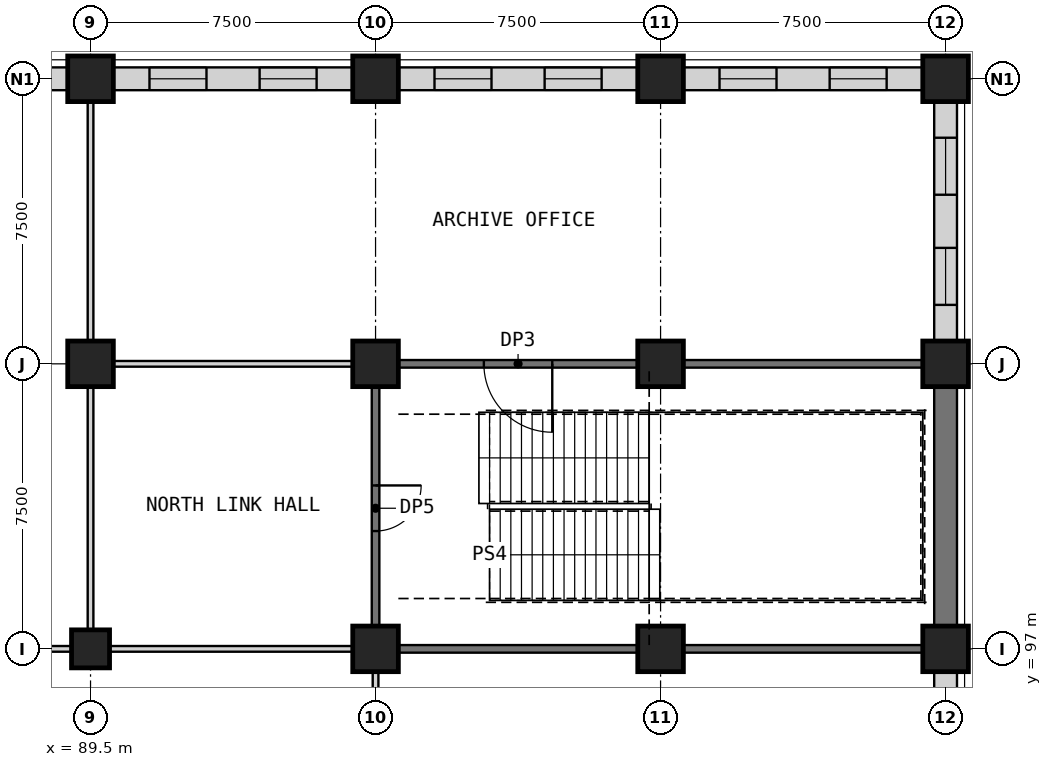
"""IFC4 building model, lengths in metres.
Left out: names, types, materials, properties, quantities, classifications, styles, units other than length and angle.
Written with IfcOpenShell. Run it as: python <this file> out.ifc"""

import sys

from ifc_helpers import new_model, si_unit, direction, frame, frame_2d, origin, origin_2d, place, context, subcontext, project, spatial, rectangle, extrude, element, fill, save


model = new_model("IFC4")
c1 = context("Model", 3, precision=1e-05, world=origin(), true_north=direction((0.0, 1.0)))
c2 = subcontext(c1, "Body", "Model", "MODEL_VIEW")
j1 = project(units=[si_unit("LENGTHUNIT", "METRE"), si_unit("PLANEANGLEUNIT", "RADIAN")], contexts=[c1])
p1 = place(None, origin())
s1 = spatial("IfcSite", under=j1, at=p1, CompositionType="ELEMENT")
p2 = place(p1, origin())
s2 = spatial("IfcBuilding", under=s1, at=p2, CompositionType="ELEMENT")
p3 = place(p2, frame((0.0, 0.0, 23.5)))
s3 = spatial("IfcBuildingStorey", under=s2, at=p3, CompositionType="ELEMENT", Elevation=23.5)
p4 = place(p3, frame((89.5, 97.0, 0.0), z_axis=(0.0, 0.0, 1.0), x_axis=(1.0, 0.0, 0.0)))
e1 = element("IfcColumn", 1, at=p4, inside=s3, PredefinedType="COLUMN", context=c2, shape_type="SweptSolid", body=[
    extrude(rectangle(XDim=1.0, YDim=1.0, at=origin_2d()), origin(), (0.0, 0.0, 1.0), 5.5),
])
for number, where, z_axis, x_axis in (
    (2, (89.5, 104.5, 0.0), (0.0, 0.0, 1.0), (1.0, 0.0, 0.0)),
    (3, (89.5, 112.0, 0.0), (0.0, 0.0, 1.0), (1.0, 0.0, 0.0)),
    (4, (97.0, 97.0, 0.0), (0.0, 0.0, 1.0), (1.0, 0.0, 0.0)),
    (5, (97.0, 104.5, 0.0), (0.0, 0.0, 1.0), (1.0, 0.0, 0.0)),
    (6, (97.0, 112.0, 0.0), (0.0, 0.0, 1.0), (1.0, 0.0, 0.0)),
    (7, (104.5, 97.0, 0.0), (0.0, 0.0, 1.0), (1.0, 0.0, 0.0)),
    (8, (104.5, 104.5, 0.0), (0.0, 0.0, 1.0), (1.0, 0.0, 0.0)),
    (9, (104.5, 112.0, 0.0), (0.0, 0.0, 1.0), (1.0, 0.0, 0.0)),
    (10, (112.0, 97.0, 0.0), (0.0, 0.0, 1.0), (1.0, 0.0, 0.0)),
    (11, (112.0, 104.5, 0.0), (0.0, 0.0, 1.0), (1.0, 0.0, 0.0)),
    (12, (112.0, 112.0, 0.0), (0.0, 0.0, 1.0), (1.0, 0.0, 0.0)),
):
    element("IfcColumn", number, at=place(p3, frame(where, z_axis=z_axis, x_axis=x_axis)), inside=s3, PredefinedType="COLUMN", context=c2, shape_type="SweptSolid", body=[
        extrude(rectangle(XDim=1.2, YDim=1.2, at=origin_2d()), origin(), (0.0, 0.0, 1.0), 5.5),
    ])
for number, where, z_axis, x_axis in (
    (13, (82.6, 97.0, 0.0), (0.0, 0.0, 1.0), (1.0, 0.0, 0.0)),
    (14, (90.0, 97.0, 0.0), (0.0, 0.0, 1.0), (1.0, 0.0, 0.0)),
):
    element("IfcWall", number, at=place(p3, frame(where, z_axis=z_axis, x_axis=x_axis)), inside=s3, PredefinedType="PARTITIONING", context=c2, shape_type="SweptSolid", body=[
        extrude(rectangle(XDim=6.4, YDim=0.15, at=frame_2d((3.2, 0.0))), origin(), (0.0, 0.0, 1.0), 5.2),
    ])
for number, where, z_axis, x_axis in (
    (15, (97.6, 97.0, 0.0), (0.0, 0.0, 1.0), (1.0, 0.0, 0.0)),
    (16, (105.1, 97.0, 0.0), (0.0, 0.0, 1.0), (1.0, 0.0, 0.0)),
):
    element("IfcWall", number, at=place(p3, frame(where, z_axis=z_axis, x_axis=x_axis)), inside=s3, PredefinedType="SHEAR", context=c2, shape_type="SweptSolid", body=[
        extrude(rectangle(XDim=6.3, YDim=0.2, at=frame_2d((3.15, 0.0))), origin(), (0.0, 0.0, 1.0), 5.2),
    ])
p5 = place(p3, frame((82.6, 112.0, 0.0), z_axis=(0.0, 0.0, 1.0), x_axis=(1.0, 0.0, 0.0)))
e17 = element("IfcWall", 17, at=p5, inside=s3, PredefinedType="PARTITIONING", context=c2, shape_type="SweptSolid", body=[
    extrude(rectangle(XDim=6.3, YDim=0.6, at=frame_2d((3.15, 0.0))), origin(), (0.0, 0.0, 1.0), 4.6),
])
p6 = place(p5, frame((0.951, 0.0, 0.9)))
e18 = element("IfcOpeningElement", 18, at=p6, cuts=e17, PredefinedType="OPENING", context=c2, shape_type="SweptSolid", body=[
    extrude(rectangle(XDim=1.5, YDim=2.8, at=frame_2d((0.75, 1.4))), frame((0.0, 0.31, 0.0), z_axis=(0.0, -1.0, 0.0), x_axis=(1.0, 0.0, 0.0)), (0.0, 0.0, 1.0), 0.62),
])
p7 = place(p5, frame((3.849, 0.0, 0.9)))
e19 = element("IfcOpeningElement", 19, at=p7, cuts=e17, PredefinedType="OPENING", context=c2, shape_type="SweptSolid", body=[
    extrude(rectangle(XDim=1.5, YDim=2.8, at=frame_2d((0.75, 1.4))), frame((0.0, 0.31, 0.0), z_axis=(0.0, -1.0, 0.0), x_axis=(1.0, 0.0, 0.0)), (0.0, 0.0, 1.0), 0.62),
])
p8 = place(p3, frame((90.1, 112.0, 0.0), z_axis=(0.0, 0.0, 1.0), x_axis=(1.0, 0.0, 0.0)))
e20 = element("IfcWall", 20, at=p8, inside=s3, PredefinedType="PARTITIONING", context=c2, shape_type="SweptSolid", body=[
    extrude(rectangle(XDim=6.3, YDim=0.6, at=frame_2d((3.15, 0.0))), origin(), (0.0, 0.0, 1.0), 4.6),
])
p9 = place(p8, frame((0.951, 0.0, 0.9)))
e21 = element("IfcOpeningElement", 21, at=p9, cuts=e20, PredefinedType="OPENING", context=c2, shape_type="SweptSolid", body=[
    extrude(rectangle(XDim=1.5, YDim=2.8, at=frame_2d((0.75, 1.4))), frame((0.0, 0.31, 0.0), z_axis=(0.0, -1.0, 0.0), x_axis=(1.0, 0.0, 0.0)), (0.0, 0.0, 1.0), 0.62),
])
p10 = place(p8, frame((3.849, 0.0, 0.9)))
e22 = element("IfcOpeningElement", 22, at=p10, cuts=e20, PredefinedType="OPENING", context=c2, shape_type="SweptSolid", body=[
    extrude(rectangle(XDim=1.5, YDim=2.8, at=frame_2d((0.75, 1.4))), frame((0.0, 0.31, 0.0), z_axis=(0.0, -1.0, 0.0), x_axis=(1.0, 0.0, 0.0)), (0.0, 0.0, 1.0), 0.62),
])
p11 = place(p3, frame((97.6, 112.0, 0.0), z_axis=(0.0, 0.0, 1.0), x_axis=(1.0, 0.0, 0.0)))
e23 = element("IfcWall", 23, at=p11, inside=s3, PredefinedType="PARTITIONING", context=c2, shape_type="SweptSolid", body=[
    extrude(rectangle(XDim=6.3, YDim=0.6, at=frame_2d((3.15, 0.0))), origin(), (0.0, 0.0, 1.0), 4.6),
])
p12 = place(p11, frame((0.951, 0.0, 0.9)))
e24 = element("IfcOpeningElement", 24, at=p12, cuts=e23, PredefinedType="OPENING", context=c2, shape_type="SweptSolid", body=[
    extrude(rectangle(XDim=1.5, YDim=2.8, at=frame_2d((0.75, 1.4))), frame((0.0, 0.31, 0.0), z_axis=(0.0, -1.0, 0.0), x_axis=(1.0, 0.0, 0.0)), (0.0, 0.0, 1.0), 0.62),
])
p13 = place(p11, frame((3.849, 0.0, 0.9)))
e25 = element("IfcOpeningElement", 25, at=p13, cuts=e23, PredefinedType="OPENING", context=c2, shape_type="SweptSolid", body=[
    extrude(rectangle(XDim=1.5, YDim=2.8, at=frame_2d((0.75, 1.4))), frame((0.0, 0.31, 0.0), z_axis=(0.0, -1.0, 0.0), x_axis=(1.0, 0.0, 0.0)), (0.0, 0.0, 1.0), 0.62),
])
p14 = place(p3, frame((105.1, 112.0, 0.0), z_axis=(0.0, 0.0, 1.0), x_axis=(1.0, 0.0, 0.0)))
e26 = element("IfcWall", 26, at=p14, inside=s3, PredefinedType="PARTITIONING", context=c2, shape_type="SweptSolid", body=[
    extrude(rectangle(XDim=6.3, YDim=0.6, at=frame_2d((3.15, 0.0))), origin(), (0.0, 0.0, 1.0), 4.6),
])
p15 = place(p14, frame((0.951, 0.0, 0.9)))
e27 = element("IfcOpeningElement", 27, at=p15, cuts=e26, PredefinedType="OPENING", context=c2, shape_type="SweptSolid", body=[
    extrude(rectangle(XDim=1.5, YDim=2.8, at=frame_2d((0.75, 1.4))), frame((0.0, 0.31, 0.0), z_axis=(0.0, -1.0, 0.0), x_axis=(1.0, 0.0, 0.0)), (0.0, 0.0, 1.0), 0.62),
])
p16 = place(p14, frame((3.849, 0.0, 0.9)))
e28 = element("IfcOpeningElement", 28, at=p16, cuts=e26, PredefinedType="OPENING", context=c2, shape_type="SweptSolid", body=[
    extrude(rectangle(XDim=1.5, YDim=2.8, at=frame_2d((0.75, 1.4))), frame((0.0, 0.31, 0.0), z_axis=(0.0, -1.0, 0.0), x_axis=(1.0, 0.0, 0.0)), (0.0, 0.0, 1.0), 0.62),
])
p17 = place(p3, frame((90.1, 104.5, 0.0), z_axis=(0.0, 0.0, 1.0), x_axis=(1.0, 0.0, 0.0)))
e29 = element("IfcWall", 29, at=p17, inside=s3, PredefinedType="PARTITIONING", context=c2, shape_type="SweptSolid", body=[
    extrude(rectangle(XDim=6.3, YDim=0.15, at=frame_2d((3.15, 0.0))), origin(), (0.0, 0.0, 1.0), 5.2),
])
p18 = place(p3, frame((103.9, 104.5, 0.0), z_axis=(0.0, 0.0, 1.0), x_axis=(-1.0, 0.0, 0.0)))
e30 = element("IfcWall", 30, at=p18, inside=s3, PredefinedType="SHEAR", context=c2, shape_type="SweptSolid", body=[
    extrude(rectangle(XDim=6.3, YDim=0.2, at=frame_2d((3.15, 0.0))), origin(), (0.0, 0.0, 1.0), 5.2),
])
p19 = place(p18, frame((2.25, 0.0, 0.0)))
e31 = element("IfcOpeningElement", 31, at=p19, cuts=e30, PredefinedType="OPENING", context=c2, shape_type="SweptSolid", body=[
    extrude(rectangle(XDim=1.8, YDim=2.4, at=frame_2d((0.9, 1.2))), frame((0.0, 0.11, 0.0), z_axis=(0.0, -1.0, 0.0), x_axis=(1.0, 0.0, 0.0)), (0.0, 0.0, 1.0), 0.22),
])
p20 = place(p3, frame((105.1, 104.5, 0.0), z_axis=(0.0, 0.0, 1.0), x_axis=(1.0, 0.0, 0.0)))
e32 = element("IfcWall", 32, at=p20, inside=s3, PredefinedType="SHEAR", context=c2, shape_type="SweptSolid", body=[
    extrude(rectangle(XDim=6.3, YDim=0.2, at=frame_2d((3.15, 0.0))), origin(), (0.0, 0.0, 1.0), 5.2),
])
p21 = place(p3, frame((97.0, 90.6, 0.0), z_axis=(0.0, 0.0, 1.0), x_axis=(0.0, 1.0, 0.0)))
e33 = element("IfcWall", 33, at=p21, inside=s3, PredefinedType="PARTITIONING", context=c2, shape_type="SweptSolid", body=[
    extrude(rectangle(XDim=5.8, YDim=0.15, at=frame_2d((2.9, 0.0))), origin(), (0.0, 0.0, 1.0), 5.2),
])
p22 = place(p3, frame((97.0, 103.9, 0.0), z_axis=(0.0, 0.0, 1.0), x_axis=(0.0, -1.0, 0.0)))
e34 = element("IfcWall", 34, at=p22, inside=s3, PredefinedType="SHEAR", context=c2, shape_type="SweptSolid", body=[
    extrude(rectangle(XDim=6.3, YDim=0.2, at=frame_2d((3.15, 0.0))), origin(), (0.0, 0.0, 1.0), 5.2),
])
p23 = place(p22, frame((2.6, 0.0, 0.0)))
e35 = element("IfcOpeningElement", 35, at=p23, cuts=e34, PredefinedType="OPENING", context=c2, shape_type="SweptSolid", body=[
    extrude(rectangle(XDim=1.2, YDim=2.1, at=frame_2d((0.6, 1.05))), frame((0.0, 0.11, 0.0), z_axis=(0.0, -1.0, 0.0), x_axis=(1.0, 0.0, 0.0)), (0.0, 0.0, 1.0), 0.22),
])
p24 = place(p3, frame((112.0, 90.6, 0.0), z_axis=(0.0, 0.0, 1.0), x_axis=(0.0, 1.0, 0.0)))
e36 = element("IfcWall", 36, at=p24, inside=s3, PredefinedType="PARTITIONING", context=c2, shape_type="SweptSolid", body=[
    extrude(rectangle(XDim=5.8, YDim=0.6, at=frame_2d((2.9, 0.0))), origin(), (0.0, 0.0, 1.0), 4.6),
])
p25 = place(p24, frame((0.816, 0.0, 0.9)))
e37 = element("IfcOpeningElement", 37, at=p25, cuts=e36, PredefinedType="OPENING", context=c2, shape_type="SweptSolid", body=[
    extrude(rectangle(XDim=1.5, YDim=2.8, at=frame_2d((0.75, 1.4))), frame((0.0, 0.31, 0.0), z_axis=(0.0, -1.0, 0.0), x_axis=(1.0, 0.0, 0.0)), (0.0, 0.0, 1.0), 0.62),
])
p26 = place(p24, frame((3.484, 0.0, 0.9)))
e38 = element("IfcOpeningElement", 38, at=p26, cuts=e36, PredefinedType="OPENING", context=c2, shape_type="SweptSolid", body=[
    extrude(rectangle(XDim=1.5, YDim=2.8, at=frame_2d((0.75, 1.4))), frame((0.0, 0.31, 0.0), z_axis=(0.0, -1.0, 0.0), x_axis=(1.0, 0.0, 0.0)), (0.0, 0.0, 1.0), 0.62),
])
p27 = place(p3, frame((112.0, 97.6, 0.0), z_axis=(0.0, 0.0, 1.0), x_axis=(0.0, 1.0, 0.0)))
e39 = element("IfcWall", 39, at=p27, inside=s3, PredefinedType="PARTITIONING", context=c2, shape_type="SweptSolid", body=[
    extrude(rectangle(XDim=6.3, YDim=0.6, at=frame_2d((3.15, 0.0))), origin(), (0.0, 0.0, 1.0), 4.6),
])
p28 = place(p3, frame((112.0, 105.1, 0.0), z_axis=(0.0, 0.0, 1.0), x_axis=(0.0, 1.0, 0.0)))
e40 = element("IfcWall", 40, at=p28, inside=s3, PredefinedType="PARTITIONING", context=c2, shape_type="SweptSolid", body=[
    extrude(rectangle(XDim=6.3, YDim=0.6, at=frame_2d((3.15, 0.0))), origin(), (0.0, 0.0, 1.0), 4.6),
])
p29 = place(p28, frame((0.951, 0.0, 0.9)))
e41 = element("IfcOpeningElement", 41, at=p29, cuts=e40, PredefinedType="OPENING", context=c2, shape_type="SweptSolid", body=[
    extrude(rectangle(XDim=1.5, YDim=2.8, at=frame_2d((0.75, 1.4))), frame((0.0, 0.31, 0.0), z_axis=(0.0, -1.0, 0.0), x_axis=(1.0, 0.0, 0.0)), (0.0, 0.0, 1.0), 0.62),
])
p30 = place(p28, frame((3.849, 0.0, 0.9)))
e42 = element("IfcOpeningElement", 42, at=p30, cuts=e40, PredefinedType="OPENING", context=c2, shape_type="SweptSolid", body=[
    extrude(rectangle(XDim=1.5, YDim=2.8, at=frame_2d((0.75, 1.4))), frame((0.0, 0.31, 0.0), z_axis=(0.0, -1.0, 0.0), x_axis=(1.0, 0.0, 0.0)), (0.0, 0.0, 1.0), 0.62),
])
p31 = place(p3, frame((89.5, 97.5, 0.0), z_axis=(0.0, 0.0, 1.0), x_axis=(0.0, 1.0, 0.0)))
e43 = element("IfcWall", 43, at=p31, inside=s3, PredefinedType="PARTITIONING", context=c2, shape_type="SweptSolid", body=[
    extrude(rectangle(XDim=6.4, YDim=0.15, at=frame_2d((3.2, 0.0))), origin(), (0.0, 0.0, 1.0), 5.2),
])
p32 = place(p3, frame((89.5, 105.1, 0.0), z_axis=(0.0, 0.0, 1.0), x_axis=(0.0, 1.0, 0.0)))
e44 = element("IfcWall", 44, at=p32, inside=s3, PredefinedType="PARTITIONING", context=c2, shape_type="SweptSolid", body=[
    extrude(rectangle(XDim=6.3, YDim=0.15, at=frame_2d((3.15, 0.0))), origin(), (0.0, 0.0, 1.0), 5.2),
])
p33 = place(p9, origin())
e45 = element("IfcWindow", 45, at=p33, inside=s3, PartitioningType="SINGLE_PANEL", PredefinedType="WINDOW", context=c2, shape_type="SweptSolid", body=[
    extrude(rectangle(XDim=1.5, YDim=2.8, at=frame_2d((0.75, 1.4))), frame((0.0, 0.03, 0.0), z_axis=(0.0, -1.0, 0.0), x_axis=(1.0, 0.0, 0.0)), (0.0, 0.0, 1.0), 0.06),
])
fill(e21, e45)
p34 = place(p10, origin())
e46 = element("IfcWindow", 46, at=p34, inside=s3, PartitioningType="SINGLE_PANEL", PredefinedType="WINDOW", context=c2, shape_type="SweptSolid", body=[
    extrude(rectangle(XDim=1.5, YDim=2.8, at=frame_2d((0.75, 1.4))), frame((0.0, 0.03, 0.0), z_axis=(0.0, -1.0, 0.0), x_axis=(1.0, 0.0, 0.0)), (0.0, 0.0, 1.0), 0.06),
])
fill(e22, e46)
p35 = place(p12, origin())
e47 = element("IfcWindow", 47, at=p35, inside=s3, PartitioningType="SINGLE_PANEL", PredefinedType="WINDOW", context=c2, shape_type="SweptSolid", body=[
    extrude(rectangle(XDim=1.5, YDim=2.8, at=frame_2d((0.75, 1.4))), frame((0.0, 0.03, 0.0), z_axis=(0.0, -1.0, 0.0), x_axis=(1.0, 0.0, 0.0)), (0.0, 0.0, 1.0), 0.06),
])
fill(e24, e47)
p36 = place(p13, origin())
e48 = element("IfcWindow", 48, at=p36, inside=s3, PartitioningType="SINGLE_PANEL", PredefinedType="WINDOW", context=c2, shape_type="SweptSolid", body=[
    extrude(rectangle(XDim=1.5, YDim=2.8, at=frame_2d((0.75, 1.4))), frame((0.0, 0.03, 0.0), z_axis=(0.0, -1.0, 0.0), x_axis=(1.0, 0.0, 0.0)), (0.0, 0.0, 1.0), 0.06),
])
fill(e25, e48)
p37 = place(p15, origin())
e49 = element("IfcWindow", 49, at=p37, inside=s3, PartitioningType="SINGLE_PANEL", PredefinedType="WINDOW", context=c2, shape_type="SweptSolid", body=[
    extrude(rectangle(XDim=1.5, YDim=2.8, at=frame_2d((0.75, 1.4))), frame((0.0, 0.03, 0.0), z_axis=(0.0, -1.0, 0.0), x_axis=(1.0, 0.0, 0.0)), (0.0, 0.0, 1.0), 0.06),
])
fill(e27, e49)
p38 = place(p16, origin())
e50 = element("IfcWindow", 50, at=p38, inside=s3, PartitioningType="SINGLE_PANEL", PredefinedType="WINDOW", context=c2, shape_type="SweptSolid", body=[
    extrude(rectangle(XDim=1.5, YDim=2.8, at=frame_2d((0.75, 1.4))), frame((0.0, 0.03, 0.0), z_axis=(0.0, -1.0, 0.0), x_axis=(1.0, 0.0, 0.0)), (0.0, 0.0, 1.0), 0.06),
])
fill(e28, e50)
p39 = place(p19, origin())
e51 = element("IfcDoor", 51, at=p39, inside=s3, OperationType="SINGLE_SWING_LEFT", PredefinedType="DOOR", context=c2, shape_type="SweptSolid", body=[
    extrude(rectangle(XDim=1.8, YDim=2.4, at=frame_2d((0.9, 1.2))), frame((0.0, 0.025, 0.0), z_axis=(0.0, -1.0, 0.0), x_axis=(1.0, 0.0, 0.0)), (0.0, 0.0, 1.0), 0.05),
])
fill(e31, e51)
p40 = place(p23, origin())
e52 = element("IfcDoor", 52, at=p40, inside=s3, OperationType="SINGLE_SWING_LEFT", PredefinedType="DOOR", context=c2, shape_type="SweptSolid", body=[
    extrude(rectangle(XDim=1.2, YDim=2.1, at=frame_2d((0.6, 1.05))), frame((0.0, 0.025, 0.0), z_axis=(0.0, -1.0, 0.0), x_axis=(1.0, 0.0, 0.0)), (0.0, 0.0, 1.0), 0.05),
])
fill(e35, e52)
p41 = place(p29, origin())
e53 = element("IfcWindow", 53, at=p41, inside=s3, PartitioningType="SINGLE_PANEL", PredefinedType="WINDOW", context=c2, shape_type="SweptSolid", body=[
    extrude(rectangle(XDim=1.5, YDim=2.8, at=frame_2d((0.75, 1.4))), frame((0.0, 0.03, 0.0), z_axis=(0.0, -1.0, 0.0), x_axis=(1.0, 0.0, 0.0)), (0.0, 0.0, 1.0), 0.06),
])
fill(e41, e53)
p42 = place(p30, origin())
e54 = element("IfcWindow", 54, at=p42, inside=s3, PartitioningType="SINGLE_PANEL", PredefinedType="WINDOW", context=c2, shape_type="SweptSolid", body=[
    extrude(rectangle(XDim=1.5, YDim=2.8, at=frame_2d((0.75, 1.4))), frame((0.0, 0.03, 0.0), z_axis=(0.0, -1.0, 0.0), x_axis=(1.0, 0.0, 0.0)), (0.0, 0.0, 1.0), 0.06),
])
fill(e42, e54)
save(model, sys.argv[1])
